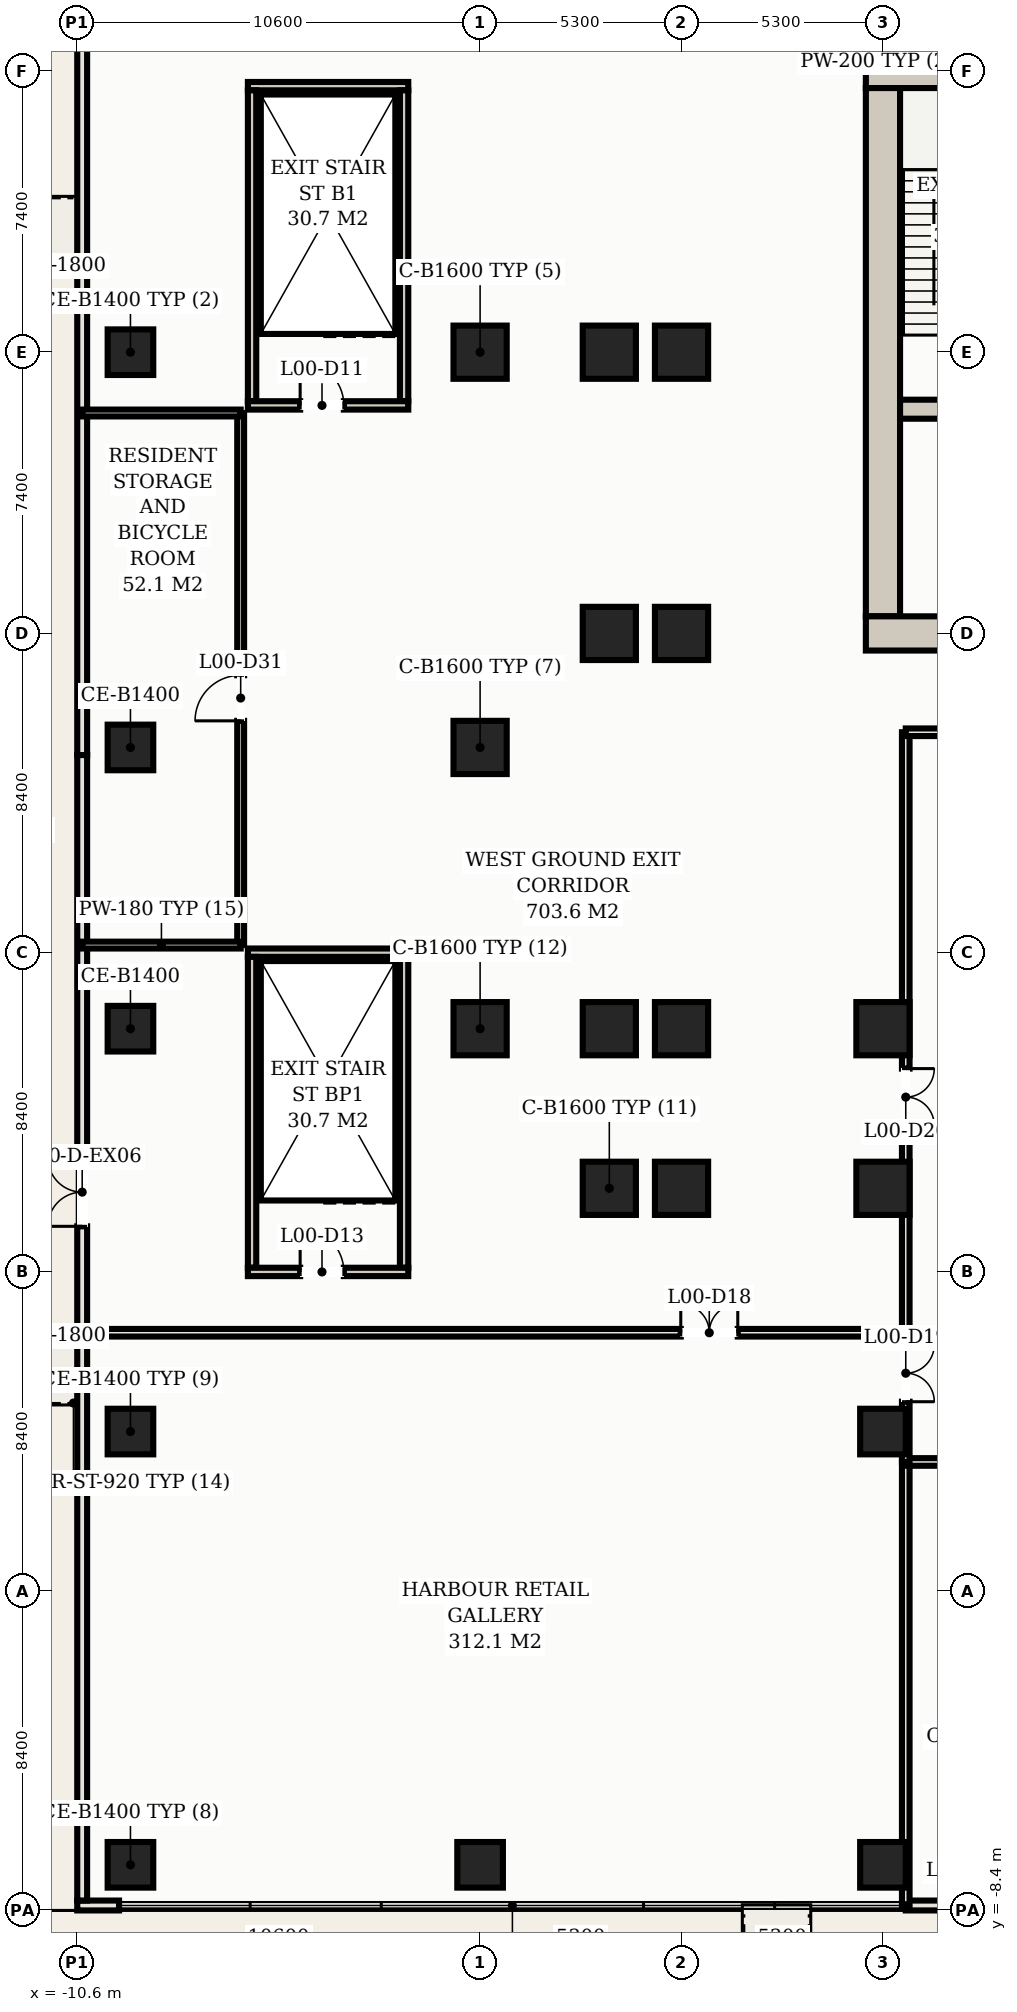
"""IFC4 building model, lengths in metres.
Left out: names, types, materials, properties, quantities, classifications, styles, units other than length and angle.
Written with IfcOpenShell. Run it as: python <this file> out.ifc"""

import sys

from ifc_helpers import new_model, si_unit, direction, frame, frame_2d, origin, origin_2d, place, context, subcontext, project, spatial, rectangle, hollow_rectangle, extrude, element, fill, save


model = new_model("IFC4")
c1 = context("Model", 3, precision=1e-05, world=origin(), true_north=direction((0.0, 1.0)))
c2 = subcontext(c1, "Body", "Model", "MODEL_VIEW")
j1 = project(units=[si_unit("LENGTHUNIT", "METRE"), si_unit("PLANEANGLEUNIT", "RADIAN")], contexts=[c1])
p1 = place(None, origin())
s1 = spatial("IfcSite", under=j1, at=p1, CompositionType="ELEMENT")
p2 = place(p1, origin())
s2 = spatial("IfcBuilding", under=s1, at=p2, CompositionType="ELEMENT")
p3 = place(p2, origin())
s3 = spatial("IfcBuildingStorey", under=s2, at=p3, CompositionType="ELEMENT", Elevation=0.0)
p4 = place(p3, frame((10.15, 40.0, 0.0), z_axis=(0.0, 0.0, 1.0), x_axis=(1.0, 0.0, 0.0)))
e1 = element("IfcWall", 1, at=p4, inside=s3, PredefinedType="SHEAR", context=c2, shape_type="SweptSolid", body=[
    extrude(rectangle(XDim=32.7, YDim=0.9, at=frame_2d((16.35, 0.0))), origin(), (0.0, 0.0, 1.0), 4.95),
])
p5 = place(p3, frame((10.6, 25.65, 0.0), z_axis=(0.0, 0.0, 1.0), x_axis=(0.0, 1.0, 0.0)))
e2 = element("IfcWall", 2, at=p5, inside=s3, PredefinedType="SHEAR", context=c2, shape_type="SweptSolid", body=[
    extrude(rectangle(XDim=13.9, YDim=0.9, at=frame_2d((6.95, 0.0))), origin(), (0.0, 0.0, 1.0), 4.95),
])
p6 = place(p3, frame((10.15, 25.2, 0.0), z_axis=(0.0, 0.0, 1.0), x_axis=(1.0, 0.0, 0.0)))
e3 = element("IfcWall", 3, at=p6, inside=s3, PredefinedType="SHEAR", context=c2, shape_type="SweptSolid", body=[
    extrude(rectangle(XDim=8.25, YDim=0.9, at=frame_2d((4.125, 0.0))), origin(), (0.0, 0.0, 1.0), 4.95),
])
p7 = place(p6, frame((6.35, 0.0, 0.0)))
e4 = element("IfcOpeningElement", 4, at=p7, cuts=e3, PredefinedType="OPENING", context=c2, shape_type="SweptSolid", body=[
    extrude(rectangle(XDim=1.25, YDim=2.2, at=frame_2d((0.625, 1.1))), frame((0.0, 0.46, 0.0), z_axis=(0.0, -1.0, 0.0), x_axis=(1.0, 0.0, 0.0)), (0.0, 0.0, 1.0), 0.92),
])
p8 = place(p3, frame((11.05, 31.1, 0.0), z_axis=(0.0, 0.0, 1.0), x_axis=(1.0, 0.0, 0.0)))
e5 = element("IfcWall", 5, at=p8, inside=s3, PredefinedType="SHEAR", context=c2, shape_type="SweptSolid", body=[
    extrude(rectangle(XDim=3.8, YDim=0.5, at=frame_2d((1.9, 0.0))), origin(), (0.0, 0.0, 1.0), 4.95),
])
p9 = place(p3, frame((10.6, 14.8, 0.0), z_axis=(0.0, 0.0, 1.0), x_axis=(1.0, 0.0, 0.0)))
e6 = element("IfcColumn", 6, at=p9, inside=s3, PredefinedType="COLUMN", context=c2, shape_type="SweptSolid", body=[
    extrude(hollow_rectangle(XDim=1.4, YDim=1.4, WallThickness=0.045, at=origin_2d()), origin(), (0.0, 0.0, 1.0), 5.2),
])
p10 = place(p3, frame((10.6, 4.2, 0.0), z_axis=(0.0, 0.0, 1.0), x_axis=(1.0, 0.0, 0.0)))
e7 = element("IfcColumn", 7, at=p10, inside=s3, PredefinedType="COLUMN", context=c2, shape_type="SweptSolid", body=[
    extrude(hollow_rectangle(XDim=1.2, YDim=1.2, WallThickness=0.04, at=origin_2d()), origin(), (0.0, 0.0, 1.0), 5.2),
])
for number, where, z_axis, x_axis in (
    (8, (10.6, 10.6, 0.0), (0.0, 0.0, 1.0), (1.0, 0.0, 0.0)),
    (9, (3.4, 10.6, 0.0), (0.0, 0.0, 1.0), (1.0, 0.0, 0.0)),
    (10, (3.4, 14.8, 0.0), (0.0, 0.0, 1.0), (1.0, 0.0, 0.0)),
    (11, (3.4, 25.2, 0.0), (0.0, 0.0, 1.0), (1.0, 0.0, 0.0)),
    (12, (3.4, 32.6, 0.0), (0.0, 0.0, 1.0), (1.0, 0.0, 0.0)),
    (13, (5.3, 10.6, 0.0), (0.0, 0.0, 1.0), (1.0, 0.0, 0.0)),
    (14, (5.3, 14.8, 0.0), (0.0, 0.0, 1.0), (1.0, 0.0, 0.0)),
    (15, (5.3, 25.2, 0.0), (0.0, 0.0, 1.0), (1.0, 0.0, 0.0)),
    (16, (5.3, 32.6, 0.0), (0.0, 0.0, 1.0), (1.0, 0.0, 0.0)),
):
    element("IfcColumn", number, at=place(p3, frame(where, z_axis=z_axis, x_axis=x_axis)), inside=s3, PredefinedType="COLUMN", context=c2, shape_type="SweptSolid", body=[
        extrude(hollow_rectangle(XDim=1.4, YDim=1.4, WallThickness=0.045, at=origin_2d()), origin(), (0.0, 0.0, 1.0), 5.2),
    ])
p11 = place(p3, frame((-9.2, -7.2, 0.0), z_axis=(0.0, 0.0, 1.0), x_axis=(1.0, 0.0, 0.0)))
e17 = element("IfcColumn", 17, at=p11, inside=s3, PredefinedType="COLUMN", context=c2, shape_type="SweptSolid", body=[
    extrude(hollow_rectangle(XDim=1.2, YDim=1.2, WallThickness=0.04, at=origin_2d()), origin(), (0.0, 0.0, 1.0), 5.164),
])
for number, where, z_axis, x_axis in (
    (18, (0.0, -7.2, 0.0), (0.0, 0.0, 1.0), (1.0, 0.0, 0.0)),
    (19, (10.6, -7.2, 0.0), (0.0, 0.0, 1.0), (1.0, 0.0, 0.0)),
):
    element("IfcColumn", number, at=place(p3, frame(where, z_axis=z_axis, x_axis=x_axis)), inside=s3, PredefinedType="COLUMN", context=c2, shape_type="SweptSolid", body=[
        extrude(hollow_rectangle(XDim=1.2, YDim=1.2, WallThickness=0.04, at=origin_2d()), origin(), (0.0, 0.0, 1.0), 5.2),
    ])
for number, where, z_axis, x_axis in (
    (20, (-9.2, 4.2, 0.0), (0.0, 0.0, 1.0), (1.0, 0.0, 0.0)),
    (21, (-9.2, 14.8, 0.0), (0.0, 0.0, 1.0), (1.0, 0.0, 0.0)),
    (22, (-9.2, 22.2, 0.0), (0.0, 0.0, 1.0), (1.0, 0.0, 0.0)),
    (23, (-9.2, 32.6, 0.0), (0.0, 0.0, 1.0), (1.0, 0.0, 0.0)),
):
    element("IfcColumn", number, at=place(p3, frame(where, z_axis=z_axis, x_axis=x_axis)), inside=s3, PredefinedType="COLUMN", context=c2, shape_type="SweptSolid", body=[
        extrude(hollow_rectangle(XDim=1.2, YDim=1.2, WallThickness=0.04, at=origin_2d()), origin(), (0.0, 0.0, 1.0), 5.164),
    ])
for number, where, z_axis, x_axis in (
    (24, (0.0, 14.8, 0.0), (0.0, 0.0, 1.0), (1.0, 0.0, 0.0)),
    (25, (0.0, 22.2, 0.0), (0.0, 0.0, 1.0), (1.0, 0.0, 0.0)),
    (26, (0.0, 32.6, 0.0), (0.0, 0.0, 1.0), (1.0, 0.0, 0.0)),
):
    element("IfcColumn", number, at=place(p3, frame(where, z_axis=z_axis, x_axis=x_axis)), inside=s3, PredefinedType="COLUMN", context=c2, shape_type="SweptSolid", body=[
        extrude(hollow_rectangle(XDim=1.4, YDim=1.4, WallThickness=0.045, at=origin_2d()), origin(), (0.0, 0.0, 1.0), 5.2),
    ])
p12 = place(p3, frame((-6.11, 39.6, 0.0), z_axis=(0.0, 0.0, 1.0), x_axis=(1.0, 0.0, 0.0)))
e27 = element("IfcWall", 27, at=p12, inside=s3, PredefinedType="SHEAR", context=c2, shape_type="SweptSolid", body=[
    extrude(rectangle(XDim=4.22, YDim=0.22, at=frame_2d((2.11, 0.0))), origin(), (0.0, 0.0, 1.0), 4.95),
])
for number, where, z_axis, x_axis in (
    (28, (-6.0, 31.31, 0.0), (0.0, 0.0, 1.0), (0.0, 1.0, 0.0)),
    (29, (-2.0, 31.31, 0.0), (0.0, 0.0, 1.0), (0.0, 1.0, 0.0)),
):
    element("IfcWall", number, at=place(p3, frame(where, z_axis=z_axis, x_axis=x_axis)), inside=s3, PredefinedType="SHEAR", context=c2, shape_type="SweptSolid", body=[
        extrude(rectangle(XDim=8.18, YDim=0.22, at=frame_2d((4.09, 0.0))), origin(), (0.0, 0.0, 1.0), 4.95),
    ])
p13 = place(p3, frame((-6.11, 31.2, 0.0), z_axis=(0.0, 0.0, 1.0), x_axis=(1.0, 0.0, 0.0)))
e30 = element("IfcWall", 30, at=p13, inside=s3, PredefinedType="SHEAR", context=c2, shape_type="SweptSolid", body=[
    extrude(rectangle(XDim=4.22, YDim=0.22, at=frame_2d((2.11, 0.0))), origin(), (0.0, 0.0, 1.0), 4.95),
])
p14 = place(p13, frame((1.375, 0.0, 0.0)))
e31 = element("IfcOpeningElement", 31, at=p14, cuts=e30, PredefinedType="OPENING", context=c2, shape_type="SweptSolid", body=[
    extrude(rectangle(XDim=1.15, YDim=2.2, at=frame_2d((0.575, 1.1))), frame((0.0, 0.12, 0.0), z_axis=(0.0, -1.0, 0.0), x_axis=(1.0, 0.0, 0.0)), (0.0, 0.0, 1.0), 0.24),
])
p15 = place(p3, frame((-6.11, 16.8, 0.0), z_axis=(0.0, 0.0, 1.0), x_axis=(1.0, 0.0, 0.0)))
e32 = element("IfcWall", 32, at=p15, inside=s3, PredefinedType="SHEAR", context=c2, shape_type="SweptSolid", body=[
    extrude(rectangle(XDim=4.22, YDim=0.22, at=frame_2d((2.11, 0.0))), origin(), (0.0, 0.0, 1.0), 4.95),
])
for number, where, z_axis, x_axis in (
    (33, (-6.0, 8.51, 0.0), (0.0, 0.0, 1.0), (0.0, 1.0, 0.0)),
    (34, (-2.0, 8.51, 0.0), (0.0, 0.0, 1.0), (0.0, 1.0, 0.0)),
):
    element("IfcWall", number, at=place(p3, frame(where, z_axis=z_axis, x_axis=x_axis)), inside=s3, PredefinedType="SHEAR", context=c2, shape_type="SweptSolid", body=[
        extrude(rectangle(XDim=8.18, YDim=0.22, at=frame_2d((4.09, 0.0))), origin(), (0.0, 0.0, 1.0), 4.95),
    ])
p16 = place(p3, frame((-6.11, 8.4, 0.0), z_axis=(0.0, 0.0, 1.0), x_axis=(1.0, 0.0, 0.0)))
e35 = element("IfcWall", 35, at=p16, inside=s3, PredefinedType="SHEAR", context=c2, shape_type="SweptSolid", body=[
    extrude(rectangle(XDim=4.22, YDim=0.22, at=frame_2d((2.11, 0.0))), origin(), (0.0, 0.0, 1.0), 4.95),
])
p17 = place(p16, frame((1.375, 0.0, 0.0)))
e36 = element("IfcOpeningElement", 36, at=p17, cuts=e35, PredefinedType="OPENING", context=c2, shape_type="SweptSolid", body=[
    extrude(rectangle(XDim=1.15, YDim=2.2, at=frame_2d((0.575, 1.1))), frame((0.0, 0.12, 0.0), z_axis=(0.0, -1.0, 0.0), x_axis=(1.0, 0.0, 0.0)), (0.0, 0.0, 1.0), 0.24),
])
p18 = place(p3, frame((-10.6, -8.27, 0.0), z_axis=(0.0, 0.0, 1.0), x_axis=(1.0, 0.0, 0.0)))
e37 = element("IfcWall", 37, at=p18, inside=s3, PredefinedType="SOLIDWALL", context=c2, shape_type="SweptSolid", body=[
    extrude(rectangle(XDim=1.1, YDim=0.26, at=frame_2d((0.55, 0.0))), origin(), (0.0, 0.0, 1.0), 4.95),
])
p19 = place(p3, frame((11.2, -8.27, 0.0), z_axis=(0.0, 0.0, 1.0), x_axis=(1.0, 0.0, 0.0)))
e38 = element("IfcWall", 38, at=p19, inside=s3, PredefinedType="SOLIDWALL", context=c2, shape_type="SweptSolid", body=[
    extrude(rectangle(XDim=10.3, YDim=0.26, at=frame_2d((5.15, 0.0))), origin(), (0.0, 0.0, 1.0), 4.95),
])
p20 = place(p19, frame((1.2, 0.0, 0.0)))
e39 = element("IfcOpeningElement", 39, at=p20, cuts=e38, PredefinedType="OPENING", context=c2, shape_type="SweptSolid", body=[
    extrude(rectangle(XDim=1.8, YDim=2.4, at=frame_2d((0.9, 1.2))), frame((0.0, 0.14, 0.0), z_axis=(0.0, -1.0, 0.0), x_axis=(1.0, 0.0, 0.0)), (0.0, 0.0, 1.0), 0.28),
])
p21 = place(p3, frame((-10.47, 46.34, 0.0), z_axis=(0.0, 0.0, 1.0), x_axis=(0.0, -1.0, 0.0)))
e40 = element("IfcWall", 40, at=p21, inside=s3, PredefinedType="SOLIDWALL", context=c2, shape_type="SweptSolid", body=[
    extrude(rectangle(XDim=24.34, YDim=0.26, at=frame_2d((12.17, 0.0))), origin(), (0.0, 0.0, 1.0), 4.95),
])
p22 = place(p3, frame((-10.47, 22.0, 0.0), z_axis=(0.0, 0.0, 1.0), x_axis=(0.0, -1.0, 0.0)))
e41 = element("IfcWall", 41, at=p22, inside=s3, PredefinedType="SOLIDWALL", context=c2, shape_type="SweptSolid", body=[
    extrude(rectangle(XDim=30.14, YDim=0.26, at=frame_2d((15.07, 0.0))), origin(), (0.0, 0.0, 1.0), 4.95),
])
p23 = place(p22, frame((10.6, 0.0, 0.0)))
e42 = element("IfcOpeningElement", 42, at=p23, cuts=e41, PredefinedType="OPENING", context=c2, shape_type="SweptSolid", body=[
    extrude(rectangle(XDim=1.8, YDim=2.4, at=frame_2d((0.9, 1.2))), frame((0.0, 0.14, 0.0), z_axis=(0.0, -1.0, 0.0), x_axis=(1.0, 0.0, 0.0)), (0.0, 0.0, 1.0), 0.28),
])
p24 = place(p3, frame((11.2, -8.27, 0.0), z_axis=(0.0, 0.0, 1.0), x_axis=(0.0, 1.0, 0.0)))
e43 = element("IfcWall", 43, at=p24, inside=s3, PredefinedType="PARTITIONING", context=c2, shape_type="SweptSolid", body=[
    extrude(rectangle(XDim=11.67, YDim=0.2, at=frame_2d((5.835, 0.0))), origin(), (0.0, 0.0, 1.0), 4.95),
])
p25 = place(p3, frame((11.2, 3.4, 0.0), z_axis=(0.0, 0.0, 1.0), x_axis=(1.0, 0.0, 0.0)))
e44 = element("IfcWall", 44, at=p25, inside=s3, PredefinedType="PARTITIONING", context=c2, shape_type="SweptSolid", body=[
    extrude(rectangle(XDim=4.2, YDim=0.2, at=frame_2d((2.1, 0.0))), origin(), (0.0, 0.0, 1.0), 4.95),
])
p26 = place(p3, frame((-10.47, 6.8, 0.0), z_axis=(0.0, 0.0, 1.0), x_axis=(1.0, 0.0, 0.0)))
e45 = element("IfcWall", 45, at=p26, inside=s3, PredefinedType="PARTITIONING", context=c2, shape_type="SweptSolid", body=[
    extrude(rectangle(XDim=21.67, YDim=0.2, at=frame_2d((10.835, 0.0))), origin(), (0.0, 0.0, 1.0), 4.95),
])
p27 = place(p26, frame((15.75, 0.0, 0.0)))
e46 = element("IfcOpeningElement", 46, at=p27, cuts=e45, PredefinedType="OPENING", context=c2, shape_type="SweptSolid", body=[
    extrude(rectangle(XDim=1.5, YDim=2.25, at=frame_2d((0.75, 1.125))), frame((0.0, 0.11, 0.0), z_axis=(0.0, -1.0, 0.0), x_axis=(1.0, 0.0, 0.0)), (0.0, 0.0, 1.0), 0.22),
])
p28 = place(p3, frame((11.2, 3.4, 0.0), z_axis=(0.0, 0.0, 1.0), x_axis=(0.0, 1.0, 0.0)))
e47 = element("IfcWall", 47, at=p28, inside=s3, PredefinedType="PARTITIONING", context=c2, shape_type="SweptSolid", body=[
    extrude(rectangle(XDim=3.4, YDim=0.2, at=frame_2d((1.7, 0.0))), origin(), (0.0, 0.0, 1.0), 4.95),
])
p29 = place(p28, frame((1.585, 0.0, 0.0)))
e48 = element("IfcOpeningElement", 48, at=p29, cuts=e47, PredefinedType="OPENING", context=c2, shape_type="SweptSolid", body=[
    extrude(rectangle(XDim=1.5, YDim=2.25, at=frame_2d((0.75, 1.125))), frame((0.0, 0.11, 0.0), z_axis=(0.0, -1.0, 0.0), x_axis=(1.0, 0.0, 0.0)), (0.0, 0.0, 1.0), 0.22),
])
p30 = place(p3, frame((11.2, 6.8, 0.0), z_axis=(0.0, 0.0, 1.0), x_axis=(0.0, 1.0, 0.0)))
e49 = element("IfcWall", 49, at=p30, inside=s3, PredefinedType="PARTITIONING", context=c2, shape_type="SweptSolid", body=[
    extrude(rectangle(XDim=15.8, YDim=0.2, at=frame_2d((7.9, 0.0))), origin(), (0.0, 0.0, 1.0), 4.95),
])
p31 = place(p30, frame((5.45, 0.0, 0.0)))
e50 = element("IfcOpeningElement", 50, at=p31, cuts=e49, PredefinedType="OPENING", context=c2, shape_type="SweptSolid", body=[
    extrude(rectangle(XDim=1.5, YDim=2.25, at=frame_2d((0.75, 1.125))), frame((0.0, 0.11, 0.0), z_axis=(0.0, -1.0, 0.0), x_axis=(1.0, 0.0, 0.0)), (0.0, 0.0, 1.0), 0.22),
])
p32 = place(p3, frame((11.2, 22.6, 0.0), z_axis=(0.0, 0.0, 1.0), x_axis=(1.0, 0.0, 0.0)))
e51 = element("IfcWall", 51, at=p32, inside=s3, PredefinedType="PARTITIONING", context=c2, shape_type="SweptSolid", body=[
    extrude(rectangle(XDim=7.25, YDim=0.2, at=frame_2d((3.625, 0.0))), origin(), (0.0, 0.0, 1.0), 4.95),
])
p33 = place(p32, frame((2.75, 0.0, 0.0)))
e52 = element("IfcOpeningElement", 52, at=p33, cuts=e51, PredefinedType="OPENING", context=c2, shape_type="SweptSolid", body=[
    extrude(rectangle(XDim=1.5, YDim=2.25, at=frame_2d((0.75, 1.125))), frame((0.0, 0.11, 0.0), z_axis=(0.0, -1.0, 0.0), x_axis=(1.0, 0.0, 0.0)), (0.0, 0.0, 1.0), 0.22),
])
p34 = place(p3, frame((-6.3, 17.0, 0.0), z_axis=(0.0, 0.0, 1.0), x_axis=(0.0, 1.0, 0.0)))
e53 = element("IfcWall", 53, at=p34, inside=s3, PredefinedType="PARTITIONING", context=c2, shape_type="SweptSolid", body=[
    extrude(rectangle(XDim=14.0, YDim=0.18, at=frame_2d((7.0, 0.0))), origin(), (0.0, 0.0, 1.0), 4.95),
])
p35 = place(p34, frame((5.9, 0.0, 0.0)))
e54 = element("IfcOpeningElement", 54, at=p35, cuts=e53, PredefinedType="OPENING", context=c2, shape_type="SweptSolid", body=[
    extrude(rectangle(XDim=1.2, YDim=2.2, at=frame_2d((0.6, 1.1))), frame((0.0, 0.1, 0.0), z_axis=(0.0, -1.0, 0.0), x_axis=(1.0, 0.0, 0.0)), (0.0, 0.0, 1.0), 0.2),
])
for number, where, z_axis, x_axis in (
    (55, (-10.47, 17.0, 0.0), (0.0, 0.0, 1.0), (1.0, 0.0, 0.0)),
    (56, (-10.47, 31.0, 0.0), (0.0, 0.0, 1.0), (1.0, 0.0, 0.0)),
):
    element("IfcWall", number, at=place(p3, frame(where, z_axis=z_axis, x_axis=x_axis)), inside=s3, PredefinedType="PARTITIONING", context=c2, shape_type="SweptSolid", body=[
        extrude(rectangle(XDim=4.17, YDim=0.18, at=frame_2d((2.085, 0.0))), origin(), (0.0, 0.0, 1.0), 4.95),
    ])
p36 = place(p3, frame((10.6, 40.0, 0.0), z_axis=(0.0, 0.0, 1.0), x_axis=(0.0, 1.0, 0.0)))
e57 = element("IfcWall", 57, at=p36, inside=s3, PredefinedType="PARTITIONING", context=c2, shape_type="SweptSolid", body=[
    extrude(rectangle(XDim=6.47, YDim=0.2, at=frame_2d((3.235, 0.0))), origin(), (0.0, 0.0, 1.0), 4.95),
])
p37 = place(p36, frame((1.3, 0.0, 0.0)))
e58 = element("IfcOpeningElement", 58, at=p37, cuts=e57, PredefinedType="OPENING", context=c2, shape_type="SweptSolid", body=[
    extrude(rectangle(XDim=1.5, YDim=2.25, at=frame_2d((0.75, 1.125))), frame((0.0, 0.11, 0.0), z_axis=(0.0, -1.0, 0.0), x_axis=(1.0, 0.0, 0.0)), (0.0, 0.0, 1.0), 0.22),
])
p38 = place(p23, frame((1.8, 0.0, 0.0), z_axis=(0.0, 0.0, 1.0), x_axis=(-1.0, 0.0, 0.0)))
e59 = element("IfcDoor", 59, at=p38, inside=s3, OperationType="DOUBLE_DOOR_SINGLE_SWING", PredefinedType="DOOR", context=c2, shape_type="SweptSolid", body=[
    extrude(rectangle(XDim=1.8, YDim=2.4, at=frame_2d((0.9, 1.2))), frame((0.0, 0.025, 0.0), z_axis=(0.0, -1.0, 0.0), x_axis=(1.0, 0.0, 0.0)), (0.0, 0.0, 1.0), 0.05),
])
fill(e42, e59)
p39 = place(p14, origin())
e60 = element("IfcDoor", 60, at=p39, inside=s3, OperationType="SINGLE_SWING_LEFT", PredefinedType="DOOR", context=c2, shape_type="SweptSolid", body=[
    extrude(rectangle(XDim=1.15, YDim=2.2, at=frame_2d((0.575, 1.1))), frame((0.0, 0.025, 0.0), z_axis=(0.0, -1.0, 0.0), x_axis=(1.0, 0.0, 0.0)), (0.0, 0.0, 1.0), 0.05),
])
fill(e31, e60)
p40 = place(p17, origin())
e61 = element("IfcDoor", 61, at=p40, inside=s3, OperationType="SINGLE_SWING_LEFT", PredefinedType="DOOR", context=c2, shape_type="SweptSolid", body=[
    extrude(rectangle(XDim=1.15, YDim=2.2, at=frame_2d((0.575, 1.1))), frame((0.0, 0.025, 0.0), z_axis=(0.0, -1.0, 0.0), x_axis=(1.0, 0.0, 0.0)), (0.0, 0.0, 1.0), 0.05),
])
fill(e36, e61)
p41 = place(p27, origin())
e62 = element("IfcDoor", 62, at=p41, inside=s3, OperationType="DOUBLE_DOOR_SINGLE_SWING", PredefinedType="DOOR", context=c2, shape_type="SweptSolid", body=[
    extrude(rectangle(XDim=1.5, YDim=2.25, at=frame_2d((0.75, 1.125))), frame((0.0, 0.025, 0.0), z_axis=(0.0, -1.0, 0.0), x_axis=(1.0, 0.0, 0.0)), (0.0, 0.0, 1.0), 0.05),
])
fill(e46, e62)
p42 = place(p29, frame((1.5, 0.0, 0.0), z_axis=(0.0, 0.0, 1.0), x_axis=(-1.0, 0.0, 0.0)))
e63 = element("IfcDoor", 63, at=p42, inside=s3, OperationType="DOUBLE_DOOR_SINGLE_SWING", PredefinedType="DOOR", context=c2, shape_type="SweptSolid", body=[
    extrude(rectangle(XDim=1.5, YDim=2.25, at=frame_2d((0.75, 1.125))), frame((0.0, 0.025, 0.0), z_axis=(0.0, -1.0, 0.0), x_axis=(1.0, 0.0, 0.0)), (0.0, 0.0, 1.0), 0.05),
])
fill(e48, e63)
p43 = place(p31, frame((1.5, 0.0, 0.0), z_axis=(0.0, 0.0, 1.0), x_axis=(-1.0, 0.0, 0.0)))
e64 = element("IfcDoor", 64, at=p43, inside=s3, OperationType="DOUBLE_DOOR_SINGLE_SWING", PredefinedType="DOOR", context=c2, shape_type="SweptSolid", body=[
    extrude(rectangle(XDim=1.5, YDim=2.25, at=frame_2d((0.75, 1.125))), frame((0.0, 0.025, 0.0), z_axis=(0.0, -1.0, 0.0), x_axis=(1.0, 0.0, 0.0)), (0.0, 0.0, 1.0), 0.05),
])
fill(e50, e64)
p44 = place(p35, origin())
e65 = element("IfcDoor", 65, at=p44, inside=s3, OperationType="SINGLE_SWING_LEFT", PredefinedType="DOOR", context=c2, shape_type="SweptSolid", body=[
    extrude(rectangle(XDim=1.2, YDim=2.2, at=frame_2d((0.6, 1.1))), frame((0.0, 0.025, 0.0), z_axis=(0.0, -1.0, 0.0), x_axis=(1.0, 0.0, 0.0)), (0.0, 0.0, 1.0), 0.05),
])
fill(e54, e65)
save(model, sys.argv[1])
